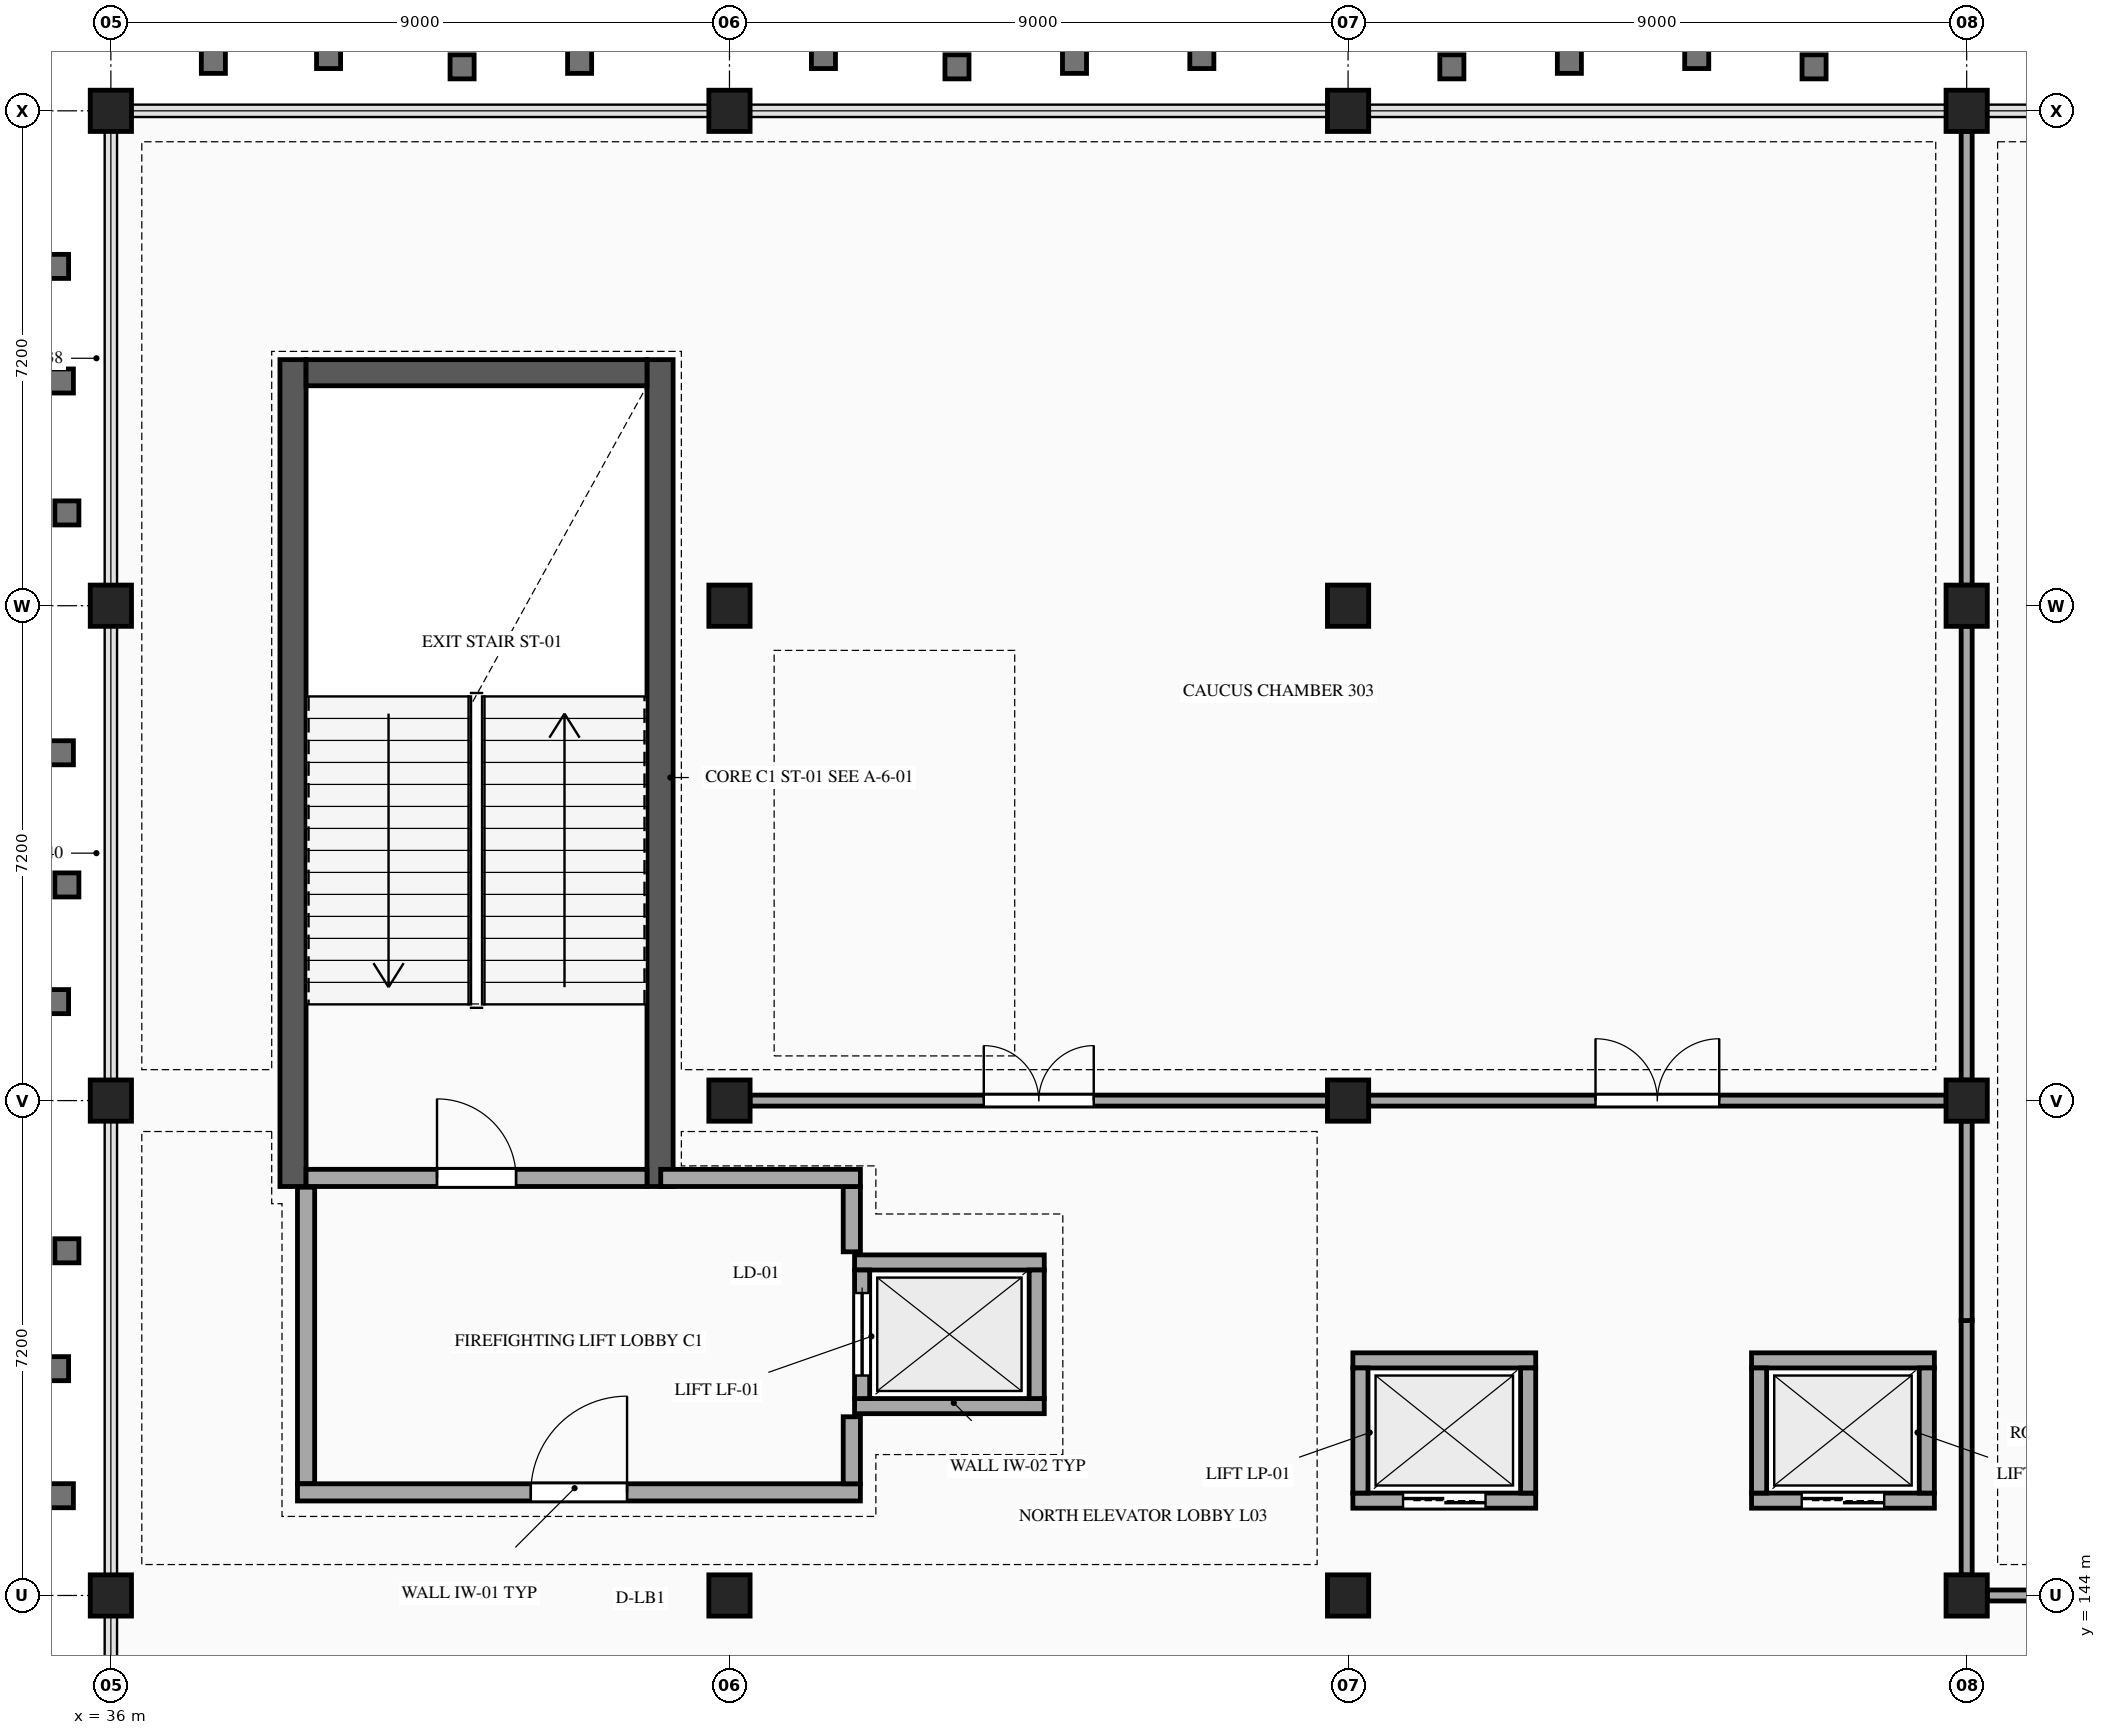
"""IFC4 building model, lengths in metres.
Left out: names, types, materials, properties, quantities, classifications, styles, units other than length and angle.
Written with IfcOpenShell. Run it as: python <this file> out.ifc"""

import sys

from ifc_helpers import new_model, si_unit, direction, frame, frame_2d, origin, origin_2d, place, context, subcontext, project, spatial, rectangle, extrude, element, fill, save


model = new_model("IFC4")
c1 = context("Model", 3, precision=1e-05, world=origin(), true_north=direction((0.0, 1.0)))
c2 = subcontext(c1, "Body", "Model", "MODEL_VIEW")
j1 = project(units=[si_unit("LENGTHUNIT", "METRE"), si_unit("PLANEANGLEUNIT", "RADIAN")], contexts=[c1])
p1 = place(None, origin())
s1 = spatial("IfcSite", under=j1, at=p1, CompositionType="ELEMENT")
p2 = place(p1, origin())
s2 = spatial("IfcBuilding", under=s1, at=p2, CompositionType="ELEMENT")
p3 = place(p2, frame((0.0, 0.0, 15.3)))
s3 = spatial("IfcBuildingStorey", under=s2, at=p3, CompositionType="ELEMENT", Elevation=15.3)
for number, where, z_axis, x_axis in (
    (1, (36.0, 144.0, 0.0), (0.0, 0.0, 1.0), (1.0, 0.0, 0.0)),
    (2, (36.0, 151.2, 0.0), (0.0, 0.0, 1.0), (1.0, 0.0, 0.0)),
    (3, (36.0, 158.4, 0.0), (0.0, 0.0, 1.0), (1.0, 0.0, 0.0)),
    (4, (36.0, 165.6, 0.0), (0.0, 0.0, 1.0), (1.0, 0.0, 0.0)),
    (5, (45.0, 144.0, 0.0), (0.0, 0.0, 1.0), (1.0, 0.0, 0.0)),
    (6, (45.0, 151.2, 0.0), (0.0, 0.0, 1.0), (1.0, 0.0, 0.0)),
    (7, (45.0, 158.4, 0.0), (0.0, 0.0, 1.0), (1.0, 0.0, 0.0)),
    (8, (45.0, 165.6, 0.0), (0.0, 0.0, 1.0), (1.0, 0.0, 0.0)),
    (9, (54.0, 144.0, 0.0), (0.0, 0.0, 1.0), (1.0, 0.0, 0.0)),
    (10, (54.0, 151.2, 0.0), (0.0, 0.0, 1.0), (1.0, 0.0, 0.0)),
    (11, (54.0, 158.4, 0.0), (0.0, 0.0, 1.0), (1.0, 0.0, 0.0)),
    (12, (54.0, 165.6, 0.0), (0.0, 0.0, 1.0), (1.0, 0.0, 0.0)),
    (13, (63.0, 144.0, 0.0), (0.0, 0.0, 1.0), (1.0, 0.0, 0.0)),
    (14, (63.0, 151.2, 0.0), (0.0, 0.0, 1.0), (1.0, 0.0, 0.0)),
    (15, (63.0, 158.4, 0.0), (0.0, 0.0, 1.0), (1.0, 0.0, 0.0)),
    (16, (63.0, 165.6, 0.0), (0.0, 0.0, 1.0), (1.0, 0.0, 0.0)),
):
    element("IfcColumn", number, at=place(p3, frame(where, z_axis=z_axis, x_axis=x_axis)), inside=s3, PredefinedType="COLUMN", context=c2, shape_type="SweptSolid", body=[
        extrude(rectangle(XDim=0.6, YDim=0.6, at=origin_2d()), origin(), (0.0, 0.0, 1.0), 4.5),
    ])
for number, where, z_axis, x_axis in (
    (17, (38.65, 149.95, 0.0), (0.0, 0.0, 1.0), (0.0, 1.0, 0.0)),
    (18, (43.99, 161.98, 0.0), (0.0, 0.0, 1.0), (0.0, -1.0, 0.0)),
):
    element("IfcWall", number, at=place(p3, frame(where, z_axis=z_axis, x_axis=x_axis)), inside=s3, PredefinedType="SHEAR", context=c2, shape_type="SweptSolid", body=[
        extrude(rectangle(XDim=12.03, YDim=0.38, at=frame_2d((6.015, 0.0))), origin(), (0.0, 0.0, 1.0), 4.25),
    ])
p4 = place(p3, frame((38.84, 161.79, 0.0), z_axis=(0.0, 0.0, 1.0), x_axis=(1.0, 0.0, 0.0)))
e19 = element("IfcWall", 19, at=p4, inside=s3, PredefinedType="SHEAR", context=c2, shape_type="SweptSolid", body=[
    extrude(rectangle(XDim=4.96, YDim=0.38, at=frame_2d((2.48, 0.0))), origin(), (0.0, 0.0, 1.0), 4.25),
])
p5 = place(p3, frame((38.84, 150.075, 0.0), z_axis=(0.0, 0.0, 1.0), x_axis=(1.0, 0.0, 0.0)))
e20 = element("IfcWall", 20, at=p5, inside=s3, PredefinedType="STANDARD", context=c2, shape_type="SweptSolid", body=[
    extrude(rectangle(XDim=4.96, YDim=0.25, at=frame_2d((2.48, 0.0))), origin(), (0.0, 0.0, 1.0), 4.25),
])
p6 = place(p5, frame((1.905, 0.0, 0.0)))
e21 = element("IfcOpeningElement", 21, at=p6, cuts=e20, PredefinedType="OPENING", context=c2, shape_type="SweptSolid", body=[
    extrude(rectangle(XDim=1.15, YDim=2.2, at=frame_2d((0.575, 1.1))), frame((0.0, 0.135, 0.0), z_axis=(0.0, -1.0, 0.0), x_axis=(1.0, 0.0, 0.0)), (0.0, 0.0, 1.0), 0.27),
])
for number, where, z_axis, x_axis in (
    (22, (46.82, 146.755, 0.0), (0.0, 0.0, 1.0), (1.0, 0.0, 0.0)),
    (23, (49.58, 148.845, 0.0), (0.0, 0.0, 1.0), (-1.0, 0.0, 0.0)),
):
    element("IfcWall", number, at=place(p3, frame(where, z_axis=z_axis, x_axis=x_axis)), inside=s3, PredefinedType="STANDARD", context=c2, shape_type="SweptSolid", body=[
        extrude(rectangle(XDim=2.76, YDim=0.22, at=frame_2d((1.38, 0.0))), origin(), (0.0, 0.0, 1.0), 4.25),
    ])
p7 = place(p3, frame((46.93, 148.735, 0.0), z_axis=(0.0, 0.0, 1.0), x_axis=(0.0, -1.0, 0.0)))
e24 = element("IfcWall", 24, at=p7, inside=s3, PredefinedType="STANDARD", context=c2, shape_type="SweptSolid", body=[
    extrude(rectangle(XDim=1.87, YDim=0.22, at=frame_2d((0.935, 0.0))), origin(), (0.0, 0.0, 1.0), 4.25),
])
p8 = place(p7, frame((0.335, 0.0, 0.0)))
e25 = element("IfcOpeningElement", 25, at=p8, cuts=e24, PredefinedType="OPENING", context=c2, shape_type="SweptSolid", body=[
    extrude(rectangle(XDim=1.2, YDim=2.2, at=frame_2d((0.6, 1.1))), frame((0.0, 0.12, 0.0), z_axis=(0.0, -1.0, 0.0), x_axis=(1.0, 0.0, 0.0)), (0.0, 0.0, 1.0), 0.24),
])
p9 = place(p3, frame((49.47, 146.865, 0.0), z_axis=(0.0, 0.0, 1.0), x_axis=(0.0, 1.0, 0.0)))
e26 = element("IfcWall", 26, at=p9, inside=s3, PredefinedType="STANDARD", context=c2, shape_type="SweptSolid", body=[
    extrude(rectangle(XDim=1.87, YDim=0.22, at=frame_2d((0.935, 0.0))), origin(), (0.0, 0.0, 1.0), 4.25),
])
p10 = place(p3, frame((54.07, 145.38, 0.0), z_axis=(0.0, 0.0, 1.0), x_axis=(1.0, 0.0, 0.0)))
e27 = element("IfcWall", 27, at=p10, inside=s3, PredefinedType="STANDARD", context=c2, shape_type="SweptSolid", body=[
    extrude(rectangle(XDim=2.66, YDim=0.22, at=frame_2d((1.33, 0.0))), origin(), (0.0, 0.0, 1.0), 3.638),
])
p11 = place(p10, frame((0.73, 0.0, 0.0)))
e28 = element("IfcOpeningElement", 28, at=p11, cuts=e27, PredefinedType="OPENING", context=c2, shape_type="SweptSolid", body=[
    extrude(rectangle(XDim=1.2, YDim=2.2, at=frame_2d((0.6, 1.1))), frame((0.0, 0.12, 0.0), z_axis=(0.0, -1.0, 0.0), x_axis=(1.0, 0.0, 0.0)), (0.0, 0.0, 1.0), 0.24),
])
p12 = place(p3, frame((56.73, 147.42, 0.0), z_axis=(0.0, 0.0, 1.0), x_axis=(-1.0, 0.0, 0.0)))
e29 = element("IfcWall", 29, at=p12, inside=s3, PredefinedType="STANDARD", context=c2, shape_type="SweptSolid", body=[
    extrude(rectangle(XDim=2.66, YDim=0.22, at=frame_2d((1.33, 0.0))), origin(), (0.0, 0.0, 1.0), 3.638),
])
for number, where, z_axis, x_axis in (
    (30, (54.18, 147.31, 0.0), (0.0, 0.0, 1.0), (0.0, -1.0, 0.0)),
    (31, (56.62, 145.49, 0.0), (0.0, 0.0, 1.0), (0.0, 1.0, 0.0)),
):
    element("IfcWall", number, at=place(p3, frame(where, z_axis=z_axis, x_axis=x_axis)), inside=s3, PredefinedType="STANDARD", context=c2, shape_type="SweptSolid", body=[
        extrude(rectangle(XDim=1.82, YDim=0.22, at=frame_2d((0.91, 0.0))), origin(), (0.0, 0.0, 1.0), 3.638),
    ])
p13 = place(p3, frame((59.87, 145.38, 0.0), z_axis=(0.0, 0.0, 1.0), x_axis=(1.0, 0.0, 0.0)))
e32 = element("IfcWall", 32, at=p13, inside=s3, PredefinedType="STANDARD", context=c2, shape_type="SweptSolid", body=[
    extrude(rectangle(XDim=2.66, YDim=0.22, at=frame_2d((1.33, 0.0))), origin(), (0.0, 0.0, 1.0), 4.25),
])
p14 = place(p13, frame((0.73, 0.0, 0.0)))
e33 = element("IfcOpeningElement", 33, at=p14, cuts=e32, PredefinedType="OPENING", context=c2, shape_type="SweptSolid", body=[
    extrude(rectangle(XDim=1.2, YDim=2.2, at=frame_2d((0.6, 1.1))), frame((0.0, 0.12, 0.0), z_axis=(0.0, -1.0, 0.0), x_axis=(1.0, 0.0, 0.0)), (0.0, 0.0, 1.0), 0.24),
])
p15 = place(p3, frame((62.53, 147.42, 0.0), z_axis=(0.0, 0.0, 1.0), x_axis=(-1.0, 0.0, 0.0)))
e34 = element("IfcWall", 34, at=p15, inside=s3, PredefinedType="STANDARD", context=c2, shape_type="SweptSolid", body=[
    extrude(rectangle(XDim=2.66, YDim=0.22, at=frame_2d((1.33, 0.0))), origin(), (0.0, 0.0, 1.0), 4.25),
])
for number, where, z_axis, x_axis in (
    (35, (59.98, 147.31, 0.0), (0.0, 0.0, 1.0), (0.0, -1.0, 0.0)),
    (36, (62.42, 145.49, 0.0), (0.0, 0.0, 1.0), (0.0, 1.0, 0.0)),
):
    element("IfcWall", number, at=place(p3, frame(where, z_axis=z_axis, x_axis=x_axis)), inside=s3, PredefinedType="STANDARD", context=c2, shape_type="SweptSolid", body=[
        extrude(rectangle(XDim=1.82, YDim=0.22, at=frame_2d((0.91, 0.0))), origin(), (0.0, 0.0, 1.0), 4.25),
    ])
p16 = place(p3, frame((38.84, 149.94, 0.0), z_axis=(0.0, 0.0, 1.0), x_axis=(0.0, -1.0, 0.0)))
e37 = element("IfcWall", 37, at=p16, inside=s3, PredefinedType="STANDARD", context=c2, shape_type="SweptSolid", body=[
    extrude(rectangle(XDim=4.315, YDim=0.25, at=frame_2d((2.157, 0.0))), origin(), (0.0, 0.0, 1.0), 3.638),
])
p17 = place(p3, frame((38.715, 145.5, 0.0), z_axis=(0.0, 0.0, 1.0), x_axis=(1.0, 0.0, 0.0)))
e38 = element("IfcWall", 38, at=p17, inside=s3, PredefinedType="STANDARD", context=c2, shape_type="SweptSolid", body=[
    extrude(rectangle(XDim=8.19, YDim=0.25, at=frame_2d((4.095, 0.0))), origin(), (0.0, 0.0, 1.0), 3.638),
])
p18 = place(p17, frame((3.395, 0.0, 0.0)))
e39 = element("IfcOpeningElement", 39, at=p18, cuts=e38, PredefinedType="OPENING", context=c2, shape_type="SweptSolid", body=[
    extrude(rectangle(XDim=1.4, YDim=2.2, at=frame_2d((0.7, 1.1))), frame((0.0, 0.135, 0.0), z_axis=(0.0, -1.0, 0.0), x_axis=(1.0, 0.0, 0.0)), (0.0, 0.0, 1.0), 0.27),
])
p19 = place(p3, frame((46.78, 145.625, 0.0), z_axis=(0.0, 0.0, 1.0), x_axis=(0.0, 1.0, 0.0)))
e40 = element("IfcWall", 40, at=p19, inside=s3, PredefinedType="STANDARD", context=c2, shape_type="SweptSolid", body=[
    extrude(rectangle(XDim=0.975, YDim=0.25, at=frame_2d((0.488, 0.0))), origin(), (0.0, 0.0, 1.0), 3.638),
])
p20 = place(p3, frame((46.78, 149.0, 0.0), z_axis=(0.0, 0.0, 1.0), x_axis=(0.0, 1.0, 0.0)))
e41 = element("IfcWall", 41, at=p20, inside=s3, PredefinedType="STANDARD", context=c2, shape_type="SweptSolid", body=[
    extrude(rectangle(XDim=0.95, YDim=0.25, at=frame_2d((0.475, 0.0))), origin(), (0.0, 0.0, 1.0), 3.638),
])
p21 = place(p3, frame((44.0, 150.075, 0.0), z_axis=(0.0, 0.0, 1.0), x_axis=(1.0, 0.0, 0.0)))
e42 = element("IfcWall", 42, at=p21, inside=s3, PredefinedType="STANDARD", context=c2, shape_type="SweptSolid", body=[
    extrude(rectangle(XDim=2.905, YDim=0.25, at=frame_2d((1.453, 0.0))), origin(), (0.0, 0.0, 1.0), 3.638),
])
p22 = place(p3, frame((63.298, 144.0, 0.0), z_axis=(0.0, 0.0, 1.0), x_axis=(1.0, 0.0, 0.0)))
e43 = element("IfcWall", 43, at=p22, inside=s3, PredefinedType="PARTITIONING", context=c2, shape_type="SweptSolid", body=[
    extrude(rectangle(XDim=8.404, YDim=0.16, at=frame_2d((4.202, 0.0))), origin(), (0.0, 0.0, 1.0), 3.638),
])
p23 = place(p22, frame((3.302, 0.0, 0.0)))
e44 = element("IfcOpeningElement", 44, at=p23, cuts=e43, PredefinedType="OPENING", context=c2, shape_type="SweptSolid", body=[
    extrude(rectangle(XDim=1.8, YDim=2.25, at=frame_2d((0.9, 1.125))), frame((0.0, 0.09, 0.0), z_axis=(0.0, -1.0, 0.0), x_axis=(1.0, 0.0, 0.0)), (0.0, 0.0, 1.0), 0.18),
])
p24 = place(p3, frame((45.298, 151.2, 0.0), z_axis=(0.0, 0.0, 1.0), x_axis=(1.0, 0.0, 0.0)))
e45 = element("IfcWall", 45, at=p24, inside=s3, PredefinedType="PARTITIONING", context=c2, shape_type="SweptSolid", body=[
    extrude(rectangle(XDim=8.404, YDim=0.16, at=frame_2d((4.202, 0.0))), origin(), (0.0, 0.0, 1.0), 3.336),
])
p25 = place(p24, frame((3.402, 0.0, 0.0)))
e46 = element("IfcOpeningElement", 46, at=p25, cuts=e45, PredefinedType="OPENING", context=c2, shape_type="SweptSolid", body=[
    extrude(rectangle(XDim=1.6, YDim=2.2, at=frame_2d((0.8, 1.1))), frame((0.0, 0.09, 0.0), z_axis=(0.0, -1.0, 0.0), x_axis=(1.0, 0.0, 0.0)), (0.0, 0.0, 1.0), 0.18),
])
p26 = place(p3, frame((54.298, 151.2, 0.0), z_axis=(0.0, 0.0, 1.0), x_axis=(1.0, 0.0, 0.0)))
e47 = element("IfcWall", 47, at=p26, inside=s3, PredefinedType="PARTITIONING", context=c2, shape_type="SweptSolid", body=[
    extrude(rectangle(XDim=8.404, YDim=0.16, at=frame_2d((4.202, 0.0))), origin(), (0.0, 0.0, 1.0), 3.336),
])
p27 = place(p26, frame((3.302, 0.0, 0.0)))
e48 = element("IfcOpeningElement", 48, at=p27, cuts=e47, PredefinedType="OPENING", context=c2, shape_type="SweptSolid", body=[
    extrude(rectangle(XDim=1.8, YDim=2.25, at=frame_2d((0.9, 1.125))), frame((0.0, 0.09, 0.0), z_axis=(0.0, -1.0, 0.0), x_axis=(1.0, 0.0, 0.0)), (0.0, 0.0, 1.0), 0.18),
])
p28 = place(p3, frame((63.0, 144.298, 0.0), z_axis=(0.0, 0.0, 1.0), x_axis=(0.0, 1.0, 0.0)))
e49 = element("IfcWall", 49, at=p28, inside=s3, PredefinedType="PARTITIONING", context=c2, shape_type="SweptSolid", body=[
    extrude(rectangle(XDim=3.702, YDim=0.16, at=frame_2d((1.851, 0.0))), origin(), (0.0, 0.0, 1.0), 3.336),
])
p29 = place(p3, frame((63.0, 148.0, 0.0), z_axis=(0.0, 0.0, 1.0), x_axis=(0.0, 1.0, 0.0)))
e50 = element("IfcWall", 50, at=p29, inside=s3, PredefinedType="PARTITIONING", context=c2, shape_type="SweptSolid", body=[
    extrude(rectangle(XDim=2.902, YDim=0.16, at=frame_2d((1.451, 0.0))), origin(), (0.0, 0.0, 1.0), 3.336),
])
for number, where, z_axis, x_axis in (
    (51, (63.0, 151.498, 0.0), (0.0, 0.0, 1.0), (0.0, 1.0, 0.0)),
    (52, (63.0, 158.698, 0.0), (0.0, 0.0, 1.0), (0.0, 1.0, 0.0)),
):
    element("IfcWall", number, at=place(p3, frame(where, z_axis=z_axis, x_axis=x_axis)), inside=s3, PredefinedType="PARTITIONING", context=c2, shape_type="SweptSolid", body=[
        extrude(rectangle(XDim=6.604, YDim=0.16, at=frame_2d((3.302, 0.0))), origin(), (0.0, 0.0, 1.0), 3.336),
    ])
p30 = place(p6, origin())
e53 = element("IfcDoor", 53, at=p30, inside=s3, OperationType="SINGLE_SWING_LEFT", PredefinedType="DOOR", context=c2, shape_type="SweptSolid", body=[
    extrude(rectangle(XDim=1.15, YDim=2.2, at=frame_2d((0.575, 1.1))), frame((0.0, 0.025, 0.0), z_axis=(0.0, -1.0, 0.0), x_axis=(1.0, 0.0, 0.0)), (0.0, 0.0, 1.0), 0.05),
])
fill(e21, e53)
p31 = place(p8, origin())
e54 = element("IfcDoor", 54, at=p31, inside=s3, OperationType="DOUBLE_DOOR_SLIDING", PredefinedType="DOOR", context=c2, shape_type="SweptSolid", body=[
    extrude(rectangle(XDim=1.2, YDim=2.2, at=frame_2d((0.6, 1.1))), frame((0.0, 0.025, 0.0), z_axis=(0.0, -1.0, 0.0), x_axis=(1.0, 0.0, 0.0)), (0.0, 0.0, 1.0), 0.05),
])
fill(e25, e54)
p32 = place(p11, origin())
e55 = element("IfcDoor", 55, at=p32, inside=s3, OperationType="DOUBLE_DOOR_SLIDING", PredefinedType="DOOR", context=c2, shape_type="SweptSolid", body=[
    extrude(rectangle(XDim=1.2, YDim=2.2, at=frame_2d((0.6, 1.1))), frame((0.0, 0.025, 0.0), z_axis=(0.0, -1.0, 0.0), x_axis=(1.0, 0.0, 0.0)), (0.0, 0.0, 1.0), 0.05),
])
fill(e28, e55)
p33 = place(p14, origin())
e56 = element("IfcDoor", 56, at=p33, inside=s3, OperationType="DOUBLE_DOOR_SLIDING", PredefinedType="DOOR", context=c2, shape_type="SweptSolid", body=[
    extrude(rectangle(XDim=1.2, YDim=2.2, at=frame_2d((0.6, 1.1))), frame((0.0, 0.025, 0.0), z_axis=(0.0, -1.0, 0.0), x_axis=(1.0, 0.0, 0.0)), (0.0, 0.0, 1.0), 0.05),
])
fill(e33, e56)
p34 = place(p18, origin())
e57 = element("IfcDoor", 57, at=p34, inside=s3, OperationType="SINGLE_SWING_RIGHT", PredefinedType="DOOR", context=c2, shape_type="SweptSolid", body=[
    extrude(rectangle(XDim=1.4, YDim=2.2, at=frame_2d((0.7, 1.1))), frame((0.0, 0.025, 0.0), z_axis=(0.0, -1.0, 0.0), x_axis=(1.0, 0.0, 0.0)), (0.0, 0.0, 1.0), 0.05),
])
fill(e39, e57)
p35 = place(p25, origin())
e58 = element("IfcDoor", 58, at=p35, inside=s3, OperationType="DOUBLE_DOOR_SINGLE_SWING", PredefinedType="DOOR", context=c2, shape_type="SweptSolid", body=[
    extrude(rectangle(XDim=1.6, YDim=2.2, at=frame_2d((0.8, 1.1))), frame((0.0, 0.025, 0.0), z_axis=(0.0, -1.0, 0.0), x_axis=(1.0, 0.0, 0.0)), (0.0, 0.0, 1.0), 0.05),
])
fill(e46, e58)
p36 = place(p27, origin())
e59 = element("IfcDoor", 59, at=p36, inside=s3, OperationType="DOUBLE_DOOR_SINGLE_SWING", PredefinedType="DOOR", context=c2, shape_type="SweptSolid", body=[
    extrude(rectangle(XDim=1.8, YDim=2.25, at=frame_2d((0.9, 1.125))), frame((0.0, 0.025, 0.0), z_axis=(0.0, -1.0, 0.0), x_axis=(1.0, 0.0, 0.0)), (0.0, 0.0, 1.0), 0.05),
])
fill(e48, e59)
save(model, sys.argv[1])
